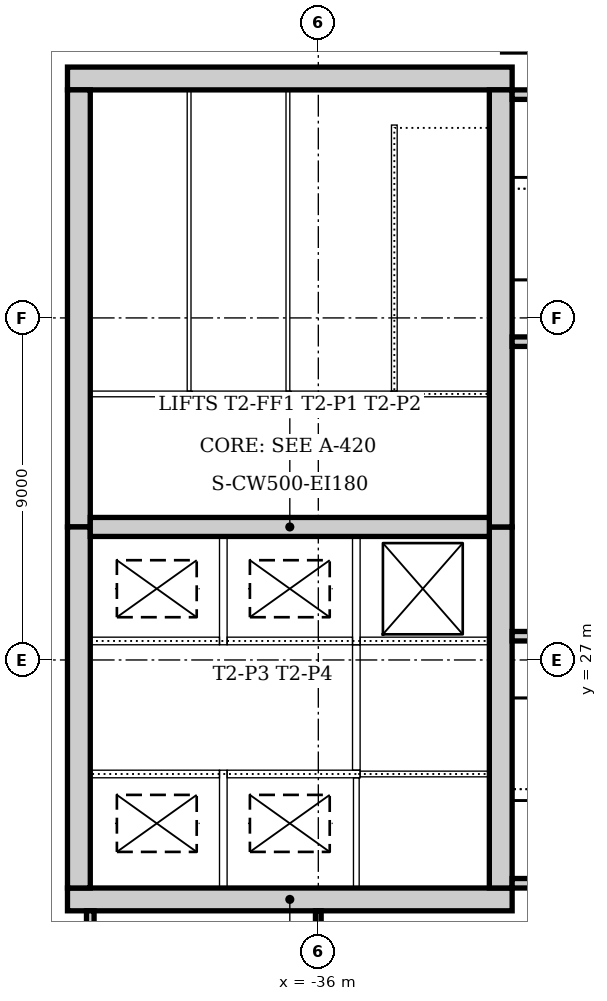
"""IFC4 building model, lengths in metres.
Left out: names, types, materials, properties, quantities, classifications, styles, units other than length and angle.
Written with IfcOpenShell. Run it as: python <this file> out.ifc"""

import sys

from ifc_helpers import new_model, si_unit, direction, frame, frame_2d, origin, origin_2d, place, context, subcontext, project, spatial, rectangle, extrude, element, fill, save


model = new_model("IFC4")
c1 = context("Model", 3, precision=1e-05, world=origin(), true_north=direction((0.0, 1.0)))
c2 = subcontext(c1, "Body", "Model", "MODEL_VIEW")
j1 = project(units=[si_unit("LENGTHUNIT", "METRE"), si_unit("PLANEANGLEUNIT", "RADIAN")], contexts=[c1])
p1 = place(None, origin())
s1 = spatial("IfcSite", under=j1, at=p1, CompositionType="ELEMENT")
p2 = place(p1, origin())
s2 = spatial("IfcBuilding", under=s1, at=p2, CompositionType="ELEMENT")
p3 = place(p2, origin())
s3 = spatial("IfcBuildingStorey", under=s2, at=p3, CompositionType="ELEMENT", Elevation=0.0)
for number, where, z_axis, x_axis in (
    (1, (-42.6, 20.7, 0.0), (0.0, 0.0, 1.0), (1.0, 0.0, 0.0)),
    (2, (-30.9, 42.3, 0.0), (0.0, 0.0, 1.0), (-1.0, 0.0, 0.0)),
):
    element("IfcWall", number, at=place(p3, frame(where, z_axis=z_axis, x_axis=x_axis)), inside=s3, PredefinedType="SOLIDWALL", context=c2, shape_type="SweptSolid", body=[
        extrude(rectangle(XDim=11.7, YDim=0.6, at=frame_2d((5.85, 0.0))), origin(), (0.0, 0.0, 1.0), 6.0),
    ])
p4 = place(p3, frame((-31.2, 21.0, 0.0), z_axis=(0.0, 0.0, 1.0), x_axis=(0.0, 1.0, 0.0)))
e3 = element("IfcWall", 3, at=p4, inside=s3, PredefinedType="SOLIDWALL", context=c2, shape_type="SweptSolid", body=[
    extrude(rectangle(XDim=9.5, YDim=0.6, at=frame_2d((4.75, 0.0))), origin(), (0.0, 0.0, 1.0), 6.0),
])
p5 = place(p4, frame((5.25, 0.0, 0.0)))
e4 = element("IfcOpeningElement", 4, at=p5, cuts=e3, PredefinedType="OPENING", context=c2, shape_type="SweptSolid", body=[
    extrude(rectangle(XDim=1.0, YDim=2.1, at=frame_2d((0.5, 1.05))), frame((0.0, 0.31, 0.0), z_axis=(0.0, -1.0, 0.0), x_axis=(1.0, 0.0, 0.0)), (0.0, 0.0, 1.0), 0.62),
])
p6 = place(p3, frame((-31.2, 30.5, 0.0), z_axis=(0.0, 0.0, 1.0), x_axis=(0.0, 1.0, 0.0)))
e5 = element("IfcWall", 5, at=p6, inside=s3, PredefinedType="SOLIDWALL", context=c2, shape_type="SweptSolid", body=[
    extrude(rectangle(XDim=11.5, YDim=0.6, at=frame_2d((5.75, 0.0))), origin(), (0.0, 0.0, 1.0), 6.0),
])
p7 = place(p6, frame((0.85, 0.0, 0.0)))
e6 = element("IfcOpeningElement", 6, at=p7, cuts=e5, PredefinedType="OPENING", context=c2, shape_type="SweptSolid", body=[
    extrude(rectangle(XDim=1.8, YDim=2.1, at=frame_2d((0.9, 1.05))), frame((0.0, 0.31, 0.0), z_axis=(0.0, -1.0, 0.0), x_axis=(1.0, 0.0, 0.0)), (0.0, 0.0, 1.0), 0.62),
])
p8 = place(p3, frame((-42.3, 42.0, 0.0), z_axis=(0.0, 0.0, 1.0), x_axis=(0.0, -1.0, 0.0)))
e7 = element("IfcWall", 7, at=p8, inside=s3, PredefinedType="SOLIDWALL", context=c2, shape_type="SweptSolid", body=[
    extrude(rectangle(XDim=11.5, YDim=0.6, at=frame_2d((5.75, 0.0))), origin(), (0.0, 0.0, 1.0), 6.0),
])
p9 = place(p8, frame((8.85, 0.0, 0.0)))
e8 = element("IfcOpeningElement", 8, at=p9, cuts=e7, PredefinedType="OPENING", context=c2, shape_type="SweptSolid", body=[
    extrude(rectangle(XDim=1.8, YDim=2.1, at=frame_2d((0.9, 1.05))), frame((0.0, 0.31, 0.0), z_axis=(0.0, -1.0, 0.0), x_axis=(1.0, 0.0, 0.0)), (0.0, 0.0, 1.0), 0.62),
])
p10 = place(p3, frame((-42.3, 30.5, 0.0), z_axis=(0.0, 0.0, 1.0), x_axis=(0.0, -1.0, 0.0)))
e9 = element("IfcWall", 9, at=p10, inside=s3, PredefinedType="SOLIDWALL", context=c2, shape_type="SweptSolid", body=[
    extrude(rectangle(XDim=9.5, YDim=0.6, at=frame_2d((4.75, 0.0))), origin(), (0.0, 0.0, 1.0), 6.0),
])
p11 = place(p10, frame((3.85, 0.0, 0.0)))
e10 = element("IfcOpeningElement", 10, at=p11, cuts=e9, PredefinedType="OPENING", context=c2, shape_type="SweptSolid", body=[
    extrude(rectangle(XDim=1.8, YDim=2.1, at=frame_2d((0.9, 1.05))), frame((0.0, 0.31, 0.0), z_axis=(0.0, -1.0, 0.0), x_axis=(1.0, 0.0, 0.0)), (0.0, 0.0, 1.0), 0.62),
])
p12 = place(p3, frame((-42.0, 30.5, 0.0), z_axis=(0.0, 0.0, 1.0), x_axis=(1.0, 0.0, 0.0)))
e11 = element("IfcWall", 11, at=p12, inside=s3, PredefinedType="SOLIDWALL", context=c2, shape_type="SweptSolid", body=[
    extrude(rectangle(XDim=10.5, YDim=0.5, at=frame_2d((5.25, 0.0))), origin(), (0.0, 0.0, 1.0), 6.0),
])
p13 = place(p3, frame((-30.9, 21.125, 0.0), z_axis=(0.0, 0.0, 1.0), x_axis=(1.0, 0.0, 0.0)))
e12 = element("IfcWall", 12, at=p13, inside=s3, PredefinedType="SOLIDWALL", context=c2, shape_type="SweptSolid", body=[
    extrude(rectangle(XDim=3.54, YDim=0.25, at=frame_2d((1.77, 0.0))), origin(), (0.0, 0.0, 1.0), 6.0),
])
p14 = place(p3, frame((-27.36, 27.625, 0.0), z_axis=(0.0, 0.0, 1.0), x_axis=(-1.0, 0.0, 0.0)))
e13 = element("IfcWall", 13, at=p14, inside=s3, PredefinedType="SOLIDWALL", context=c2, shape_type="SweptSolid", body=[
    extrude(rectangle(XDim=3.54, YDim=0.25, at=frame_2d((1.77, 0.0))), origin(), (0.0, 0.0, 1.0), 6.0),
])
p15 = place(p14, frame((1.69, 0.0, 0.0)))
e14 = element("IfcOpeningElement", 14, at=p15, cuts=e13, PredefinedType="OPENING", context=c2, shape_type="SweptSolid", body=[
    extrude(rectangle(XDim=1.1, YDim=2.1, at=frame_2d((0.55, 1.05))), frame((0.0, 0.135, 0.0), z_axis=(0.0, -1.0, 0.0), x_axis=(1.0, 0.0, 0.0)), (0.0, 0.0, 1.0), 0.27),
])
p16 = place(p3, frame((-30.9, 35.375, 0.0), z_axis=(0.0, 0.0, 1.0), x_axis=(1.0, 0.0, 0.0)))
e15 = element("IfcWall", 15, at=p16, inside=s3, PredefinedType="SOLIDWALL", context=c2, shape_type="SweptSolid", body=[
    extrude(rectangle(XDim=3.54, YDim=0.25, at=frame_2d((1.77, 0.0))), origin(), (0.0, 0.0, 1.0), 6.0),
])
p17 = place(p16, frame((0.75, 0.0, 0.0)))
e16 = element("IfcOpeningElement", 16, at=p17, cuts=e15, PredefinedType="OPENING", context=c2, shape_type="SweptSolid", body=[
    extrude(rectangle(XDim=1.1, YDim=2.1, at=frame_2d((0.55, 1.05))), frame((0.0, 0.135, 0.0), z_axis=(0.0, -1.0, 0.0), x_axis=(1.0, 0.0, 0.0)), (0.0, 0.0, 1.0), 0.27),
])
p18 = place(p3, frame((-27.36, 41.875, 0.0), z_axis=(0.0, 0.0, 1.0), x_axis=(-1.0, 0.0, 0.0)))
e17 = element("IfcWall", 17, at=p18, inside=s3, PredefinedType="SOLIDWALL", context=c2, shape_type="SweptSolid", body=[
    extrude(rectangle(XDim=3.54, YDim=0.25, at=frame_2d((1.77, 0.0))), origin(), (0.0, 0.0, 1.0), 6.0),
])
p19 = place(p3, frame((-30.602, 43.547, 0.0), z_axis=(0.0, 0.0, 1.0), x_axis=(1.0, 0.0, 0.0)))
e18 = element("IfcColumn", 18, at=p19, inside=s3, PredefinedType="COLUMN", context=c2, shape_type="SweptSolid", body=[
    extrude(rectangle(XDim=1.1, YDim=1.1, at=origin_2d()), origin(), (0.0, 0.0, 1.0), 5.7),
])
p20 = place(p3, frame((-42.0, 3.7, 0.0), z_axis=(0.0, 0.0, 1.0), x_axis=(0.0, 1.0, 0.0)))
e19 = element("IfcWall", 19, at=p20, inside=s3, PredefinedType="PARTITIONING", context=c2, shape_type="SweptSolid", body=[
    extrude(rectangle(XDim=16.7, YDim=0.2, at=frame_2d((8.35, 0.0))), origin(), (0.0, 0.0, 1.0), 5.7),
])
p21 = place(p20, frame((7.8, 0.0, 0.0)))
e20 = element("IfcOpeningElement", 20, at=p21, cuts=e19, PredefinedType="OPENING", context=c2, shape_type="SweptSolid", body=[
    extrude(rectangle(XDim=1.0, YDim=2.1, at=frame_2d((0.5, 1.05))), frame((0.0, 0.11, 0.0), z_axis=(0.0, -1.0, 0.0), x_axis=(1.0, 0.0, 0.0)), (0.0, 0.0, 1.0), 0.22),
])
p22 = place(p3, frame((-36.0, 18.42, 0.0), z_axis=(0.0, 0.0, 1.0), x_axis=(0.0, 1.0, 0.0)))
e21 = element("IfcWall", 21, at=p22, inside=s3, PredefinedType="PARTITIONING", context=c2, shape_type="SweptSolid", body=[
    extrude(rectangle(XDim=1.98, YDim=0.15, at=frame_2d((0.99, 0.0))), origin(), (0.0, 0.0, 1.0), 5.7),
])
p23 = place(p3, frame((-38.5, 21.0, 0.0), z_axis=(0.0, 0.0, 1.0), x_axis=(0.0, 1.0, 0.0)))
e22 = element("IfcWall", 22, at=p23, inside=s3, PredefinedType="SOLIDWALL", context=c2, shape_type="SweptSolid", body=[
    extrude(rectangle(XDim=3.1, YDim=0.2, at=frame_2d((1.55, 0.0))), origin(), (0.0, 0.0, 1.0), 6.0),
])
p24 = place(p3, frame((-38.6, 24.0, 0.0), z_axis=(0.0, 0.0, 1.0), x_axis=(-1.0, 0.0, 0.0)))
e23 = element("IfcWall", 23, at=p24, inside=s3, PredefinedType="SOLIDWALL", context=c2, shape_type="SweptSolid", body=[
    extrude(rectangle(XDim=3.4, YDim=0.2, at=frame_2d((1.7, 0.0))), origin(), (0.0, 0.0, 1.0), 6.0),
])
p25 = place(p24, frame((0.8, 0.0, 0.0)))
e24 = element("IfcOpeningElement", 24, at=p25, cuts=e23, PredefinedType="OPENING", context=c2, shape_type="SweptSolid", body=[
    extrude(rectangle(XDim=1.1, YDim=2.1, at=frame_2d((0.55, 1.05))), frame((0.0, 0.11, 0.0), z_axis=(0.0, -1.0, 0.0), x_axis=(1.0, 0.0, 0.0)), (0.0, 0.0, 1.0), 0.22),
])
p26 = place(p3, frame((-34.9, 24.0, 0.0), z_axis=(0.0, 0.0, 1.0), x_axis=(-1.0, 0.0, 0.0)))
e25 = element("IfcWall", 25, at=p26, inside=s3, PredefinedType="SOLIDWALL", context=c2, shape_type="SweptSolid", body=[
    extrude(rectangle(XDim=3.5, YDim=0.2, at=frame_2d((1.75, 0.0))), origin(), (0.0, 0.0, 1.0), 6.0),
])
p27 = place(p26, frame((1.3, 0.0, 0.0)))
e26 = element("IfcOpeningElement", 26, at=p27, cuts=e25, PredefinedType="OPENING", context=c2, shape_type="SweptSolid", body=[
    extrude(rectangle(XDim=1.1, YDim=2.1, at=frame_2d((0.55, 1.05))), frame((0.0, 0.11, 0.0), z_axis=(0.0, -1.0, 0.0), x_axis=(1.0, 0.0, 0.0)), (0.0, 0.0, 1.0), 0.22),
])
p28 = place(p3, frame((-38.5, 27.4, 0.0), z_axis=(0.0, 0.0, 1.0), x_axis=(0.0, 1.0, 0.0)))
e27 = element("IfcWall", 27, at=p28, inside=s3, PredefinedType="SOLIDWALL", context=c2, shape_type="SweptSolid", body=[
    extrude(rectangle(XDim=2.85, YDim=0.2, at=frame_2d((1.425, 0.0))), origin(), (0.0, 0.0, 1.0), 6.0),
])
p29 = place(p3, frame((-42.0, 27.5, 0.0), z_axis=(0.0, 0.0, 1.0), x_axis=(1.0, 0.0, 0.0)))
e28 = element("IfcWall", 28, at=p29, inside=s3, PredefinedType="SOLIDWALL", context=c2, shape_type="SweptSolid", body=[
    extrude(rectangle(XDim=3.4, YDim=0.2, at=frame_2d((1.7, 0.0))), origin(), (0.0, 0.0, 1.0), 6.0),
])
p30 = place(p29, frame((1.5, 0.0, 0.0)))
e29 = element("IfcOpeningElement", 29, at=p30, cuts=e28, PredefinedType="OPENING", context=c2, shape_type="SweptSolid", body=[
    extrude(rectangle(XDim=1.1, YDim=2.1, at=frame_2d((0.55, 1.05))), frame((0.0, 0.11, 0.0), z_axis=(0.0, -1.0, 0.0), x_axis=(1.0, 0.0, 0.0)), (0.0, 0.0, 1.0), 0.22),
])
p31 = place(p3, frame((-35.0, 27.4, 0.0), z_axis=(0.0, 0.0, 1.0), x_axis=(0.0, 1.0, 0.0)))
e30 = element("IfcWall", 30, at=p31, inside=s3, PredefinedType="SOLIDWALL", context=c2, shape_type="SweptSolid", body=[
    extrude(rectangle(XDim=2.85, YDim=0.2, at=frame_2d((1.425, 0.0))), origin(), (0.0, 0.0, 1.0), 6.0),
])
p32 = place(p3, frame((-38.4, 27.5, 0.0), z_axis=(0.0, 0.0, 1.0), x_axis=(1.0, 0.0, 0.0)))
e31 = element("IfcWall", 31, at=p32, inside=s3, PredefinedType="SOLIDWALL", context=c2, shape_type="SweptSolid", body=[
    extrude(rectangle(XDim=3.3, YDim=0.2, at=frame_2d((1.65, 0.0))), origin(), (0.0, 0.0, 1.0), 6.0),
])
p33 = place(p32, frame((1.1, 0.0, 0.0)))
e32 = element("IfcOpeningElement", 32, at=p33, cuts=e31, PredefinedType="OPENING", context=c2, shape_type="SweptSolid", body=[
    extrude(rectangle(XDim=1.1, YDim=2.1, at=frame_2d((0.55, 1.05))), frame((0.0, 0.11, 0.0), z_axis=(0.0, -1.0, 0.0), x_axis=(1.0, 0.0, 0.0)), (0.0, 0.0, 1.0), 0.22),
])
p34 = place(p3, frame((-34.9, 27.5, 0.0), z_axis=(0.0, 0.0, 1.0), x_axis=(1.0, 0.0, 0.0)))
e33 = element("IfcWall", 33, at=p34, inside=s3, PredefinedType="SOLIDWALL", context=c2, shape_type="SweptSolid", body=[
    extrude(rectangle(XDim=3.4, YDim=0.2, at=frame_2d((1.7, 0.0))), origin(), (0.0, 0.0, 1.0), 6.0),
])
p35 = place(p34, frame((1.1, 0.0, 0.0)))
e34 = element("IfcOpeningElement", 34, at=p35, cuts=e33, PredefinedType="OPENING", context=c2, shape_type="SweptSolid", body=[
    extrude(rectangle(XDim=1.1, YDim=2.1, at=frame_2d((0.55, 1.05))), frame((0.0, 0.11, 0.0), z_axis=(0.0, -1.0, 0.0), x_axis=(1.0, 0.0, 0.0)), (0.0, 0.0, 1.0), 0.22),
])
p36 = place(p3, frame((-35.0, 24.1, 0.0), z_axis=(0.0, 0.0, 1.0), x_axis=(0.0, 1.0, 0.0)))
e35 = element("IfcWall", 35, at=p36, inside=s3, PredefinedType="SOLIDWALL", context=c2, shape_type="SweptSolid", body=[
    extrude(rectangle(XDim=3.3, YDim=0.2, at=frame_2d((1.65, 0.0))), origin(), (0.0, 0.0, 1.0), 6.0),
])
p37 = place(p36, frame((1.15, 0.0, 0.0)))
e36 = element("IfcOpeningElement", 36, at=p37, cuts=e35, PredefinedType="OPENING", context=c2, shape_type="SweptSolid", body=[
    extrude(rectangle(XDim=1.0, YDim=2.1, at=frame_2d((0.5, 1.05))), frame((0.0, 0.11, 0.0), z_axis=(0.0, -1.0, 0.0), x_axis=(1.0, 0.0, 0.0)), (0.0, 0.0, 1.0), 0.22),
])
p38 = place(p3, frame((-35.0, 21.0, 0.0), z_axis=(0.0, 0.0, 1.0), x_axis=(0.0, 1.0, 0.0)))
e37 = element("IfcWall", 37, at=p38, inside=s3, PredefinedType="SOLIDWALL", context=c2, shape_type="SweptSolid", body=[
    extrude(rectangle(XDim=2.9, YDim=0.15, at=frame_2d((1.45, 0.0))), origin(), (0.0, 0.0, 1.0), 6.0),
])
p39 = place(p3, frame((-31.5, 24.0, 0.0), z_axis=(0.0, 0.0, 1.0), x_axis=(-1.0, 0.0, 0.0)))
e38 = element("IfcWall", 38, at=p39, inside=s3, PredefinedType="SOLIDWALL", context=c2, shape_type="SweptSolid", body=[
    extrude(rectangle(XDim=3.4, YDim=0.15, at=frame_2d((1.7, 0.0))), origin(), (0.0, 0.0, 1.0), 6.0),
])
p40 = place(p3, frame((-34.075, 34.0, 0.0), z_axis=(0.0, 0.0, 1.0), x_axis=(1.0, 0.0, 0.0)))
e39 = element("IfcWall", 39, at=p40, inside=s3, PredefinedType="SOLIDWALL", context=c2, shape_type="SweptSolid", body=[
    extrude(rectangle(XDim=2.575, YDim=0.15, at=frame_2d((1.288, 0.0))), origin(), (0.0, 0.0, 1.0), 6.0),
])
p41 = place(p3, frame((-34.0, 41.075, 0.0), z_axis=(0.0, 0.0, 1.0), x_axis=(0.0, -1.0, 0.0)))
e40 = element("IfcWall", 40, at=p41, inside=s3, PredefinedType="SOLIDWALL", context=c2, shape_type="SweptSolid", body=[
    extrude(rectangle(XDim=7.0, YDim=0.15, at=frame_2d((3.5, 0.0))), origin(), (0.0, 0.0, 1.0), 6.0),
])
p42 = place(p3, frame((-39.325, 34.0, 0.0), z_axis=(0.0, 0.0, 1.0), x_axis=(-1.0, 0.0, 0.0)))
e41 = element("IfcWall", 41, at=p42, inside=s3, PredefinedType="PARTITIONING", context=c2, shape_type="SweptSolid", body=[
    extrude(rectangle(XDim=2.675, YDim=0.15, at=frame_2d((1.337, 0.0))), origin(), (0.0, 0.0, 1.0), 5.7),
])
p43 = place(p42, frame((0.975, 0.0, 0.0)))
e42 = element("IfcOpeningElement", 42, at=p43, cuts=e41, PredefinedType="OPENING", context=c2, shape_type="SweptSolid", body=[
    extrude(rectangle(XDim=0.8, YDim=2.1, at=frame_2d((0.4, 1.05))), frame((0.0, 0.085, 0.0), z_axis=(0.0, -1.0, 0.0), x_axis=(1.0, 0.0, 0.0)), (0.0, 0.0, 1.0), 0.17),
])
p44 = place(p3, frame((-36.725, 34.0, 0.0), z_axis=(0.0, 0.0, 1.0), x_axis=(-1.0, 0.0, 0.0)))
e43 = element("IfcWall", 43, at=p44, inside=s3, PredefinedType="PARTITIONING", context=c2, shape_type="SweptSolid", body=[
    extrude(rectangle(XDim=2.6, YDim=0.15, at=frame_2d((1.3, 0.0))), origin(), (0.0, 0.0, 1.0), 5.7),
])
p45 = place(p44, frame((0.975, 0.0, 0.0)))
e44 = element("IfcOpeningElement", 44, at=p45, cuts=e43, PredefinedType="OPENING", context=c2, shape_type="SweptSolid", body=[
    extrude(rectangle(XDim=0.8, YDim=2.1, at=frame_2d((0.4, 1.05))), frame((0.0, 0.085, 0.0), z_axis=(0.0, -1.0, 0.0), x_axis=(1.0, 0.0, 0.0)), (0.0, 0.0, 1.0), 0.17),
])
p46 = place(p3, frame((-34.075, 34.0, 0.0), z_axis=(0.0, 0.0, 1.0), x_axis=(-1.0, 0.0, 0.0)))
e45 = element("IfcWall", 45, at=p46, inside=s3, PredefinedType="PARTITIONING", context=c2, shape_type="SweptSolid", body=[
    extrude(rectangle(XDim=2.65, YDim=0.15, at=frame_2d((1.325, 0.0))), origin(), (0.0, 0.0, 1.0), 5.7),
])
p47 = place(p46, frame((0.925, 0.0, 0.0)))
e46 = element("IfcOpeningElement", 46, at=p47, cuts=e45, PredefinedType="OPENING", context=c2, shape_type="SweptSolid", body=[
    extrude(rectangle(XDim=0.8, YDim=2.1, at=frame_2d((0.4, 1.05))), frame((0.0, 0.085, 0.0), z_axis=(0.0, -1.0, 0.0), x_axis=(1.0, 0.0, 0.0)), (0.0, 0.0, 1.0), 0.17),
])
for number, where, z_axis, x_axis in (
    (47, (-39.4, 34.075, 0.0), (0.0, 0.0, 1.0), (0.0, 1.0, 0.0)),
    (48, (-36.8, 34.075, 0.0), (0.0, 0.0, 1.0), (0.0, 1.0, 0.0)),
):
    element("IfcWall", number, at=place(p3, frame(where, z_axis=z_axis, x_axis=x_axis)), inside=s3, PredefinedType="PARTITIONING", context=c2, shape_type="SweptSolid", body=[
        extrude(rectangle(XDim=7.925, YDim=0.1, at=frame_2d((3.962, 0.0))), origin(), (0.0, 0.0, 1.0), 5.7),
    ])
p48 = place(p25, origin())
e49 = element("IfcDoor", 49, at=p48, inside=s3, OperationType="SLIDING_TO_LEFT", PredefinedType="DOOR", context=c2, shape_type="SweptSolid", body=[
    extrude(rectangle(XDim=1.1, YDim=2.1, at=frame_2d((0.55, 1.05))), frame((0.0, 0.025, 0.0), z_axis=(0.0, -1.0, 0.0), x_axis=(1.0, 0.0, 0.0)), (0.0, 0.0, 1.0), 0.05),
])
fill(e24, e49)
p49 = place(p27, origin())
e50 = element("IfcDoor", 50, at=p49, inside=s3, OperationType="SLIDING_TO_LEFT", PredefinedType="DOOR", context=c2, shape_type="SweptSolid", body=[
    extrude(rectangle(XDim=1.1, YDim=2.1, at=frame_2d((0.55, 1.05))), frame((0.0, 0.025, 0.0), z_axis=(0.0, -1.0, 0.0), x_axis=(1.0, 0.0, 0.0)), (0.0, 0.0, 1.0), 0.05),
])
fill(e26, e50)
p50 = place(p30, origin())
e51 = element("IfcDoor", 51, at=p50, inside=s3, OperationType="SLIDING_TO_LEFT", PredefinedType="DOOR", context=c2, shape_type="SweptSolid", body=[
    extrude(rectangle(XDim=1.1, YDim=2.1, at=frame_2d((0.55, 1.05))), frame((0.0, 0.025, 0.0), z_axis=(0.0, -1.0, 0.0), x_axis=(1.0, 0.0, 0.0)), (0.0, 0.0, 1.0), 0.05),
])
fill(e29, e51)
p51 = place(p33, origin())
e52 = element("IfcDoor", 52, at=p51, inside=s3, OperationType="SLIDING_TO_LEFT", PredefinedType="DOOR", context=c2, shape_type="SweptSolid", body=[
    extrude(rectangle(XDim=1.1, YDim=2.1, at=frame_2d((0.55, 1.05))), frame((0.0, 0.025, 0.0), z_axis=(0.0, -1.0, 0.0), x_axis=(1.0, 0.0, 0.0)), (0.0, 0.0, 1.0), 0.05),
])
fill(e32, e52)
p52 = place(p35, origin())
e53 = element("IfcDoor", 53, at=p52, inside=s3, OperationType="SLIDING_TO_LEFT", PredefinedType="DOOR", context=c2, shape_type="SweptSolid", body=[
    extrude(rectangle(XDim=1.1, YDim=2.1, at=frame_2d((0.55, 1.05))), frame((0.0, 0.025, 0.0), z_axis=(0.0, -1.0, 0.0), x_axis=(1.0, 0.0, 0.0)), (0.0, 0.0, 1.0), 0.05),
])
fill(e34, e53)
p53 = place(p37, origin())
e54 = element("IfcDoor", 54, at=p53, inside=s3, OperationType="SINGLE_SWING_RIGHT", PredefinedType="DOOR", context=c2, shape_type="SweptSolid", body=[
    extrude(rectangle(XDim=1.0, YDim=2.1, at=frame_2d((0.5, 1.05))), frame((0.0, 0.025, 0.0), z_axis=(0.0, -1.0, 0.0), x_axis=(1.0, 0.0, 0.0)), (0.0, 0.0, 1.0), 0.05),
])
fill(e36, e54)
p54 = place(p5, frame((1.0, 0.0, 0.0), z_axis=(0.0, 0.0, 1.0), x_axis=(-1.0, 0.0, 0.0)))
e55 = element("IfcDoor", 55, at=p54, inside=s3, OperationType="SINGLE_SWING_LEFT", PredefinedType="DOOR", context=c2, shape_type="SweptSolid", body=[
    extrude(rectangle(XDim=1.0, YDim=2.1, at=frame_2d((0.5, 1.05))), frame((0.0, 0.025, 0.0), z_axis=(0.0, -1.0, 0.0), x_axis=(1.0, 0.0, 0.0)), (0.0, 0.0, 1.0), 0.05),
])
fill(e4, e55)
p55 = place(p7, origin())
e56 = element("IfcDoor", 56, at=p55, inside=s3, OperationType="DOUBLE_DOOR_SINGLE_SWING", PredefinedType="DOOR", context=c2, shape_type="SweptSolid", body=[
    extrude(rectangle(XDim=1.8, YDim=2.1, at=frame_2d((0.9, 1.05))), frame((0.0, 0.025, 0.0), z_axis=(0.0, -1.0, 0.0), x_axis=(1.0, 0.0, 0.0)), (0.0, 0.0, 1.0), 0.05),
])
fill(e6, e56)
p56 = place(p11, origin())
e57 = element("IfcDoor", 57, at=p56, inside=s3, OperationType="DOUBLE_DOOR_SINGLE_SWING", PredefinedType="DOOR", context=c2, shape_type="SweptSolid", body=[
    extrude(rectangle(XDim=1.8, YDim=2.1, at=frame_2d((0.9, 1.05))), frame((0.0, 0.025, 0.0), z_axis=(0.0, -1.0, 0.0), x_axis=(1.0, 0.0, 0.0)), (0.0, 0.0, 1.0), 0.05),
])
fill(e10, e57)
p57 = place(p9, frame((1.8, 0.0, 0.0), z_axis=(0.0, 0.0, 1.0), x_axis=(-1.0, 0.0, 0.0)))
e58 = element("IfcDoor", 58, at=p57, inside=s3, OperationType="DOUBLE_DOOR_SINGLE_SWING", PredefinedType="DOOR", context=c2, shape_type="SweptSolid", body=[
    extrude(rectangle(XDim=1.8, YDim=2.1, at=frame_2d((0.9, 1.05))), frame((0.0, 0.025, 0.0), z_axis=(0.0, -1.0, 0.0), x_axis=(1.0, 0.0, 0.0)), (0.0, 0.0, 1.0), 0.05),
])
fill(e8, e58)
p58 = place(p43, frame((0.8, 0.0, 0.0), z_axis=(0.0, 0.0, 1.0), x_axis=(-1.0, 0.0, 0.0)))
e59 = element("IfcDoor", 59, at=p58, inside=s3, OperationType="SINGLE_SWING_RIGHT", PredefinedType="DOOR", context=c2, shape_type="SweptSolid", body=[
    extrude(rectangle(XDim=0.8, YDim=2.1, at=frame_2d((0.4, 1.05))), frame((0.0, 0.025, 0.0), z_axis=(0.0, -1.0, 0.0), x_axis=(1.0, 0.0, 0.0)), (0.0, 0.0, 1.0), 0.05),
])
fill(e42, e59)
p59 = place(p45, frame((0.8, 0.0, 0.0), z_axis=(0.0, 0.0, 1.0), x_axis=(-1.0, 0.0, 0.0)))
e60 = element("IfcDoor", 60, at=p59, inside=s3, OperationType="SINGLE_SWING_RIGHT", PredefinedType="DOOR", context=c2, shape_type="SweptSolid", body=[
    extrude(rectangle(XDim=0.8, YDim=2.1, at=frame_2d((0.4, 1.05))), frame((0.0, 0.025, 0.0), z_axis=(0.0, -1.0, 0.0), x_axis=(1.0, 0.0, 0.0)), (0.0, 0.0, 1.0), 0.05),
])
fill(e44, e60)
p60 = place(p47, frame((0.8, 0.0, 0.0), z_axis=(0.0, 0.0, 1.0), x_axis=(-1.0, 0.0, 0.0)))
e61 = element("IfcDoor", 61, at=p60, inside=s3, OperationType="SINGLE_SWING_LEFT", PredefinedType="DOOR", context=c2, shape_type="SweptSolid", body=[
    extrude(rectangle(XDim=0.8, YDim=2.1, at=frame_2d((0.4, 1.05))), frame((0.0, 0.025, 0.0), z_axis=(0.0, -1.0, 0.0), x_axis=(1.0, 0.0, 0.0)), (0.0, 0.0, 1.0), 0.05),
])
fill(e46, e61)
save(model, sys.argv[1])
